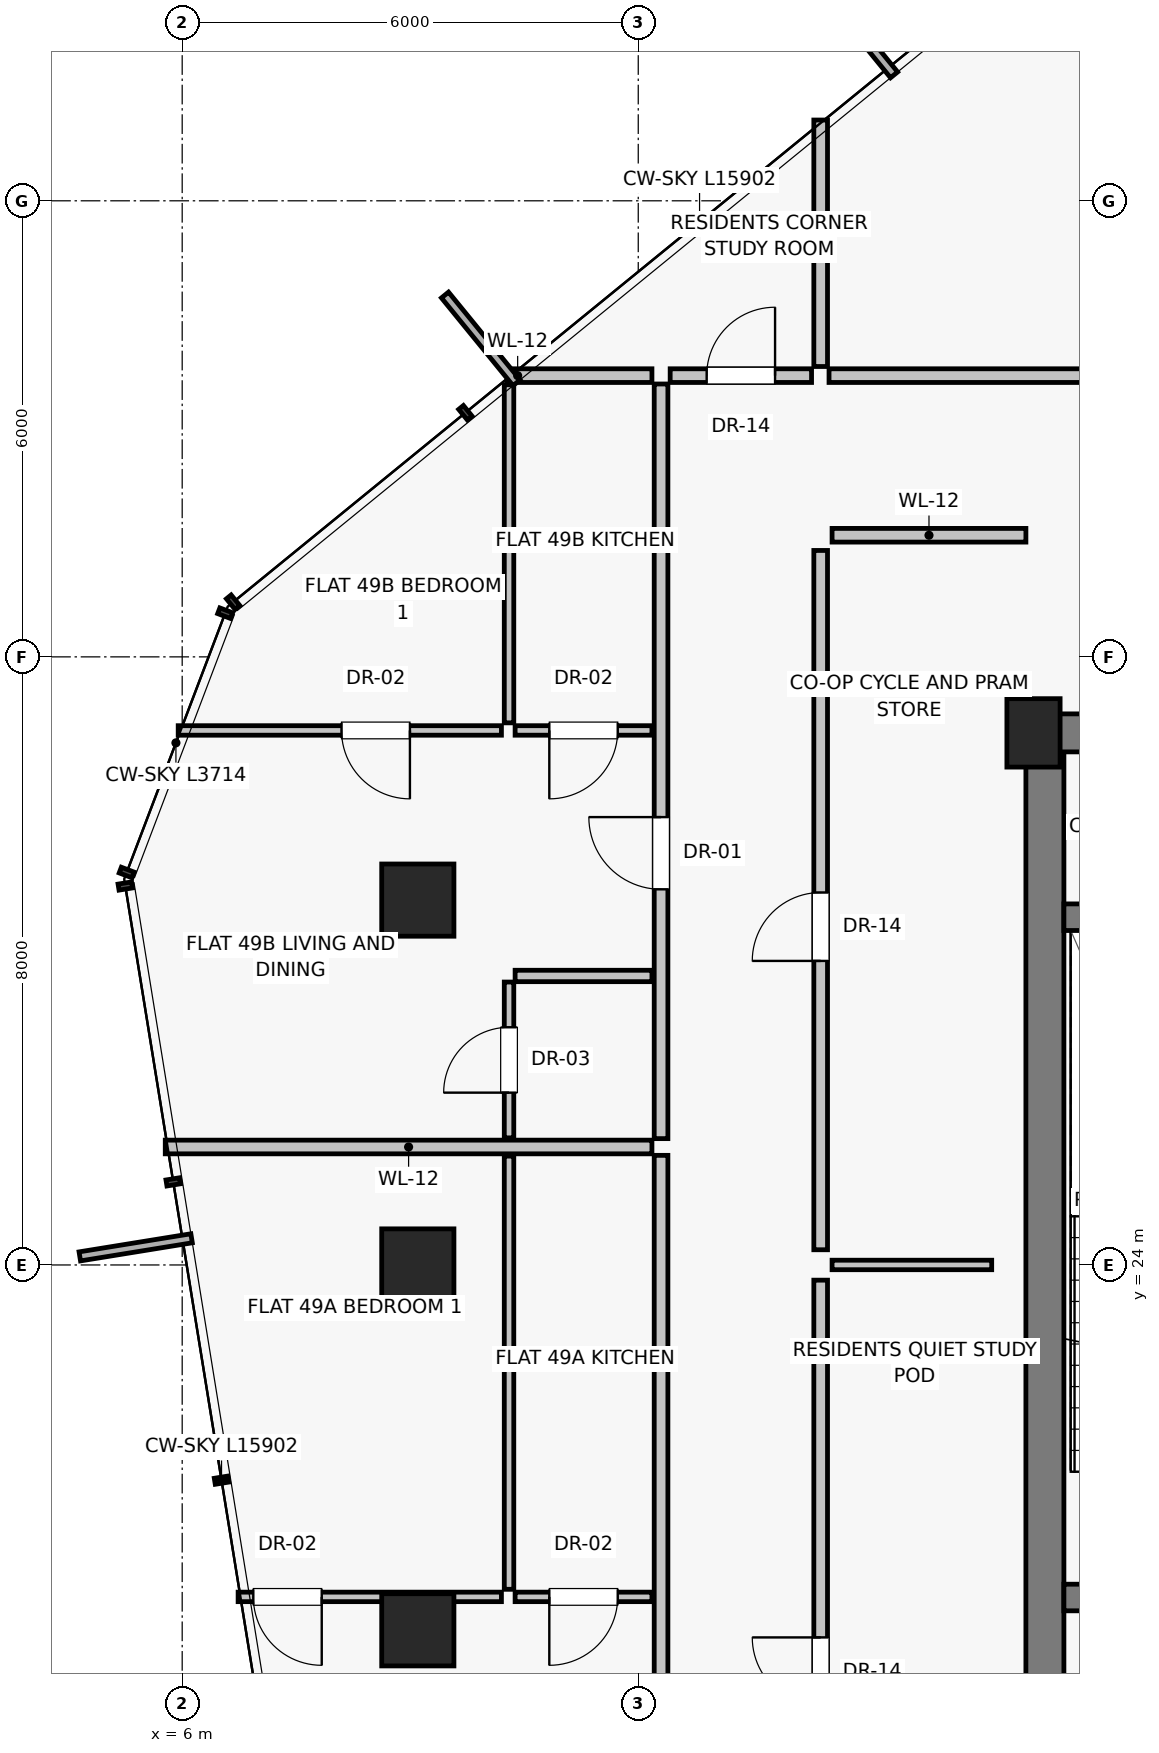
"""IFC4 building model, lengths in metres.
Left out: names, types, materials, properties, quantities, classifications, styles, units other than length and angle.
Written with IfcOpenShell. Run it as: python <this file> out.ifc"""

import sys

from ifc_helpers import new_model, si_unit, direction, frame, frame_2d, origin, origin_2d, place, context, subcontext, project, spatial, rectangle, extrude, source, transform, mapped, element, fill, save


model = new_model("IFC4")
c1 = context("Model", 3, precision=1e-05, world=origin(), true_north=direction((0.0, 1.0)))
c2 = subcontext(c1, "Body", "Model", "MODEL_VIEW")
j1 = project(units=[si_unit("LENGTHUNIT", "METRE"), si_unit("PLANEANGLEUNIT", "RADIAN")], contexts=[c1])
p1 = place(None, origin())
s1 = spatial("IfcSite", under=j1, at=p1, CompositionType="ELEMENT")
p2 = place(p1, origin())
s2 = spatial("IfcBuilding", under=s1, at=p2, CompositionType="ELEMENT")
p3 = place(p2, frame((0.0, 0.0, 174.35)))
s3 = spatial("IfcBuildingStorey", under=s2, at=p3, CompositionType="ELEMENT", Elevation=174.35)
p4 = place(p3, frame((17.2, 31.0, 0.0), z_axis=(0.0, 0.0, 1.0), x_axis=(1.0, 0.0, 0.0)))
e1 = element("IfcColumn", 1, at=p4, inside=s3, PredefinedType="PILASTER", context=c2, shape_type="SweptSolid", body=[
    extrude(rectangle(XDim=0.7, YDim=0.9, at=origin_2d()), origin(), (0.0, 0.0, 1.0), 4.5),
])
for number, where, z_axis, x_axis in (
    (2, (9.1, 28.8, -0.32), (0.0, 0.0, 1.0), (1.0, 0.0, 0.0)),
    (3, (9.1, 24.0, -0.32), (0.0, 0.0, 1.0), (1.0, 0.0, 0.0)),
    (4, (9.1, 19.2, -0.32), (0.0, 0.0, 1.0), (1.0, 0.0, 0.0)),
):
    element("IfcColumn", number, at=place(p3, frame(where, z_axis=z_axis, x_axis=x_axis)), inside=s3, PredefinedType="COLUMN", context=c2, shape_type="SweptSolid", body=[
        extrude(rectangle(XDim=0.95, YDim=0.95, at=origin_2d()), origin(), (0.0, 0.0, 1.0), 4.82),
    ])
p5 = place(p3, frame((17.35, 16.8, 0.0), z_axis=(0.0, 0.0, 1.0), x_axis=(0.0, 1.0, 0.0)))
e5 = element("IfcWall", 5, at=p5, inside=s3, PredefinedType="SHEAR", context=c2, shape_type="SweptSolid", body=[
    extrude(rectangle(XDim=14.2, YDim=0.5, at=frame_2d((7.1, 0.0))), origin(), (0.0, 0.0, 1.0), 4.265),
])
p6 = place(p3, frame((17.2, 31.0, 0.0), z_axis=(0.0, 0.0, 1.0), x_axis=(1.0, 0.0, 0.0)))
e6 = element("IfcWall", 6, at=p6, inside=s3, PredefinedType="SHEAR", context=c2, shape_type="SweptSolid", body=[
    extrude(rectangle(XDim=3.8, YDim=0.5, at=frame_2d((1.9, 0.0))), origin(), (0.0, 0.0, 1.0), 4.265),
])
p7 = place(p6, frame((1.25, 0.0, 0.0)))
e7 = element("IfcOpeningElement", 7, at=p7, cuts=e6, PredefinedType="OPENING", context=c2, shape_type="SweptSolid", body=[
    extrude(rectangle(XDim=0.86, YDim=2.01, at=frame_2d((0.43, 1.005))), frame((0.0, 0.26, 0.0), z_axis=(0.0, -1.0, 0.0), x_axis=(1.0, 0.0, 0.0)), (0.0, 0.0, 1.0), 0.52),
])
p8 = place(p3, frame((17.6, 19.625, 0.0), z_axis=(0.0, 0.0, 1.0), x_axis=(1.0, 0.0, 0.0)))
e8 = element("IfcWall", 8, at=p8, inside=s3, PredefinedType="SHEAR", context=c2, shape_type="SweptSolid", body=[
    extrude(rectangle(XDim=3.375, YDim=0.35, at=frame_2d((1.688, 0.0))), origin(), (0.0, 0.0, 1.0), 4.265),
])
p9 = place(p8, frame((1.05, 0.0, 0.0)))
e9 = element("IfcOpeningElement", 9, at=p9, cuts=e8, PredefinedType="OPENING", context=c2, shape_type="SweptSolid", body=[
    extrude(rectangle(XDim=1.1, YDim=2.03, at=frame_2d((0.55, 1.015))), frame((0.0, 0.185, 0.0), z_axis=(0.0, -1.0, 0.0), x_axis=(1.0, 0.0, 0.0)), (0.0, 0.0, 1.0), 0.37),
])
p10 = place(p3, frame((17.6, 28.575, 0.0), z_axis=(0.0, 0.0, 1.0), x_axis=(1.0, 0.0, 0.0)))
e10 = element("IfcWall", 10, at=p10, inside=s3, PredefinedType="SHEAR", context=c2, shape_type="SweptSolid", body=[
    extrude(rectangle(XDim=3.375, YDim=0.35, at=frame_2d((1.688, 0.0))), origin(), (0.0, 0.0, 1.0), 4.265),
])
p11 = place(p3, frame((14.4, 14.4, 0.0), z_axis=(0.0, 0.0, 1.0), x_axis=(0.0, 1.0, 0.0)))
e11 = element("IfcWall", 11, at=p11, inside=s3, PredefinedType="PARTITIONING", context=c2, shape_type="SweptSolid", body=[
    extrude(rectangle(XDim=9.4, YDim=0.18, at=frame_2d((4.7, 0.0))), origin(), (0.0, 0.0, 1.0), 4.265),
])
p12 = place(p11, frame((3.8, 0.0, 0.0)))
e12 = element("IfcOpeningElement", 12, at=p12, cuts=e11, PredefinedType="OPENING", context=c2, shape_type="SweptSolid", body=[
    extrude(rectangle(XDim=0.9, YDim=2.01, at=frame_2d((0.45, 1.005))), frame((0.0, 0.1, 0.0), z_axis=(0.0, -1.0, 0.0), x_axis=(1.0, 0.0, 0.0)), (0.0, 0.0, 1.0), 0.2),
])
p13 = place(p3, frame((14.4, 24.2, 0.0), z_axis=(0.0, 0.0, 1.0), x_axis=(0.0, 1.0, 0.0)))
e13 = element("IfcWall", 13, at=p13, inside=s3, PredefinedType="PARTITIONING", context=c2, shape_type="SweptSolid", body=[
    extrude(rectangle(XDim=9.2, YDim=0.18, at=frame_2d((4.6, 0.0))), origin(), (0.0, 0.0, 1.0), 4.265),
])
p14 = place(p13, frame((3.8, 0.0, 0.0)))
e14 = element("IfcOpeningElement", 14, at=p14, cuts=e13, PredefinedType="OPENING", context=c2, shape_type="SweptSolid", body=[
    extrude(rectangle(XDim=0.9, YDim=2.01, at=frame_2d((0.45, 1.005))), frame((0.0, 0.1, 0.0), z_axis=(0.0, -1.0, 0.0), x_axis=(1.0, 0.0, 0.0)), (0.0, 0.0, 1.0), 0.2),
])
p15 = place(p3, frame((14.55, 24.0, 0.0), z_axis=(0.0, 0.0, 1.0), x_axis=(1.0, 0.0, 0.0)))
e15 = element("IfcWall", 15, at=p15, inside=s3, PredefinedType="PARTITIONING", context=c2, shape_type="SweptSolid", body=[
    extrude(rectangle(XDim=2.1, YDim=0.125, at=frame_2d((1.05, 0.0))), origin(), (0.0, 0.0, 1.0), 4.265),
])
p16 = place(p3, frame((14.55, 33.6, 0.0), z_axis=(0.0, 0.0, 1.0), x_axis=(1.0, 0.0, 0.0)))
e16 = element("IfcWall", 16, at=p16, inside=s3, PredefinedType="PARTITIONING", context=c2, shape_type="SweptSolid", body=[
    extrude(rectangle(XDim=2.55, YDim=0.18, at=frame_2d((1.275, 0.0))), origin(), (0.0, 0.0, 1.0), 4.265),
])
p17 = place(p3, frame((14.4, 35.82, 0.0), z_axis=(0.0, 0.0, 1.0), x_axis=(0.0, 1.0, 0.0)))
e17 = element("IfcWall", 17, at=p17, inside=s3, PredefinedType="PARTITIONING", context=c2, shape_type="SweptSolid", body=[
    extrude(rectangle(XDim=3.243, YDim=0.18, at=frame_2d((1.621, 0.0))), origin(), (0.0, 0.0, 1.0), 4.265),
])
p18 = place(p3, frame((14.51, 35.7, 0.0), z_axis=(0.0, 0.0, 1.0), x_axis=(1.0, 0.0, 0.0)))
e18 = element("IfcWall", 18, at=p18, inside=s3, PredefinedType="PARTITIONING", context=c2, shape_type="SweptSolid", body=[
    extrude(rectangle(XDim=10.724, YDim=0.18, at=frame_2d((5.362, 0.0))), origin(), (0.0, 0.0, 1.0), 4.265),
])
p19 = place(p18, frame((4.462, 0.0, 0.0)))
e19 = element("IfcOpeningElement", 19, at=p19, cuts=e18, PredefinedType="OPENING", context=c2, shape_type="SweptSolid", body=[
    extrude(rectangle(XDim=1.8, YDim=2.25, at=frame_2d((0.9, 1.125))), frame((0.0, 0.1, 0.0), z_axis=(0.0, -1.0, 0.0), x_axis=(1.0, 0.0, 0.0)), (0.0, 0.0, 1.0), 0.2),
])
p20 = place(p3, frame((12.18, 35.7, 0.0), z_axis=(0.0, 0.0, 1.0), x_axis=(-1.0, 0.0, 0.0)))
e20 = element("IfcWall", 20, at=p20, inside=s3, PredefinedType="PARTITIONING", context=c2, shape_type="SweptSolid", body=[
    extrude(rectangle(XDim=1.903, YDim=0.18, at=frame_2d((0.951, 0.0))), origin(), (0.0, 0.0, 1.0), 4.265),
])
p21 = place(p3, frame((12.3, 12.21, 0.0), z_axis=(0.0, 0.0, 1.0), x_axis=(0.0, 1.0, 0.0)))
e21 = element("IfcWall", 21, at=p21, inside=s3, PredefinedType="PARTITIONING", context=c2, shape_type="SweptSolid", body=[
    extrude(rectangle(XDim=13.232, YDim=0.18, at=frame_2d((6.616, 0.0))), origin(), (0.0, 0.0, 1.0), 4.265),
])
p22 = place(p21, frame((4.306, 0.0, 0.0)))
e22 = element("IfcOpeningElement", 22, at=p22, cuts=e21, PredefinedType="OPENING", context=c2, shape_type="SweptSolid", body=[
    extrude(rectangle(XDim=0.95, YDim=2.02, at=frame_2d((0.475, 1.01))), frame((0.0, 0.1, 0.0), z_axis=(0.0, -1.0, 0.0), x_axis=(1.0, 0.0, 0.0)), (0.0, 0.0, 1.0), 0.2),
])
p23 = place(p3, frame((12.18, 19.633, 0.0), z_axis=(0.0, 0.0, 1.0), x_axis=(-1.0, 0.0, 0.0)))
e23 = element("IfcWall", 23, at=p23, inside=s3, PredefinedType="PARTITIONING", context=c2, shape_type="SweptSolid", body=[
    extrude(rectangle(XDim=1.8, YDim=0.125, at=frame_2d((0.9, 0.0))), origin(), (0.0, 0.0, 1.0), 4.265),
])
p24 = place(p23, frame((0.45, 0.0, 0.0)))
e24 = element("IfcOpeningElement", 24, at=p24, cuts=e23, PredefinedType="OPENING", context=c2, shape_type="SweptSolid", body=[
    extrude(rectangle(XDim=0.9, YDim=2.01, at=frame_2d((0.45, 1.005))), frame((0.0, 0.073, 0.0), z_axis=(0.0, -1.0, 0.0), x_axis=(1.0, 0.0, 0.0)), (0.0, 0.0, 1.0), 0.145),
])
p25 = place(p3, frame((10.3, 19.733, 0.0), z_axis=(0.0, 0.0, 1.0), x_axis=(0.0, 1.0, 0.0)))
e25 = element("IfcWall", 25, at=p25, inside=s3, PredefinedType="PARTITIONING", context=c2, shape_type="SweptSolid", body=[
    extrude(rectangle(XDim=5.699, YDim=0.125, at=frame_2d((2.85, 0.0))), origin(), (0.0, 0.0, 1.0), 4.265),
])
p26 = place(p3, frame((10.2, 19.633, 0.0), z_axis=(0.0, 0.0, 1.0), x_axis=(-1.0, 0.0, 0.0)))
e26 = element("IfcWall", 26, at=p26, inside=s3, PredefinedType="PARTITIONING", context=c2, shape_type="SweptSolid", body=[
    extrude(rectangle(XDim=3.464, YDim=0.125, at=frame_2d((1.732, 0.0))), origin(), (0.0, 0.0, 1.0), 3.719),
])
p27 = place(p26, frame((2.364, 0.0, 0.0)))
e27 = element("IfcOpeningElement", 27, at=p27, cuts=e26, PredefinedType="OPENING", context=c2, shape_type="SweptSolid", body=[
    extrude(rectangle(XDim=0.9, YDim=2.01, at=frame_2d((0.45, 1.005))), frame((0.0, 0.073, 0.0), z_axis=(0.0, -1.0, 0.0), x_axis=(1.0, 0.0, 0.0)), (0.0, 0.0, 1.0), 0.145),
])
p28 = place(p3, frame((12.18, 25.552, 0.0), z_axis=(0.0, 0.0, 1.0), x_axis=(-1.0, 0.0, 0.0)))
e28 = element("IfcWall", 28, at=p28, inside=s3, PredefinedType="PARTITIONING", context=c2, shape_type="SweptSolid", body=[
    extrude(rectangle(XDim=6.403, YDim=0.18, at=frame_2d((3.201, 0.0))), origin(), (0.0, 0.0, 1.0), 4.265),
])
p29 = place(p3, frame((12.3, 25.662, 0.0), z_axis=(0.0, 0.0, 1.0), x_axis=(0.0, 1.0, 0.0)))
e29 = element("IfcWall", 29, at=p29, inside=s3, PredefinedType="PARTITIONING", context=c2, shape_type="SweptSolid", body=[
    extrude(rectangle(XDim=9.928, YDim=0.18, at=frame_2d((4.964, 0.0))), origin(), (0.0, 0.0, 1.0), 4.265),
])
p30 = place(p29, frame((3.28, 0.0, 0.0)))
e30 = element("IfcOpeningElement", 30, at=p30, cuts=e29, PredefinedType="OPENING", context=c2, shape_type="SweptSolid", body=[
    extrude(rectangle(XDim=0.95, YDim=2.02, at=frame_2d((0.475, 1.01))), frame((0.0, 0.1, 0.0), z_axis=(0.0, -1.0, 0.0), x_axis=(1.0, 0.0, 0.0)), (0.0, 0.0, 1.0), 0.2),
])
p31 = place(p3, frame((12.18, 27.802, 0.0), z_axis=(0.0, 0.0, 1.0), x_axis=(-1.0, 0.0, 0.0)))
e31 = element("IfcWall", 31, at=p31, inside=s3, PredefinedType="PARTITIONING", context=c2, shape_type="SweptSolid", body=[
    extrude(rectangle(XDim=1.8, YDim=0.15, at=frame_2d((0.9, 0.0))), origin(), (0.0, 0.0, 1.0), 4.265),
])
p32 = place(p3, frame((10.3, 25.672, 0.0), z_axis=(0.0, 0.0, 1.0), x_axis=(0.0, 1.0, 0.0)))
e32 = element("IfcWall", 32, at=p32, inside=s3, PredefinedType="PARTITIONING", context=c2, shape_type="SweptSolid", body=[
    extrude(rectangle(XDim=2.05, YDim=0.125, at=frame_2d((1.025, 0.0))), origin(), (0.0, 0.0, 1.0), 4.265),
])
p33 = place(p32, frame((0.595, 0.0, 0.0)))
e33 = element("IfcOpeningElement", 33, at=p33, cuts=e32, PredefinedType="OPENING", context=c2, shape_type="SweptSolid", body=[
    extrude(rectangle(XDim=0.86, YDim=2.01, at=frame_2d((0.43, 1.005))), frame((0.0, 0.073, 0.0), z_axis=(0.0, -1.0, 0.0), x_axis=(1.0, 0.0, 0.0)), (0.0, 0.0, 1.0), 0.145),
])
p34 = place(p3, frame((12.18, 31.032, 0.0), z_axis=(0.0, 0.0, 1.0), x_axis=(-1.0, 0.0, 0.0)))
e34 = element("IfcWall", 34, at=p34, inside=s3, PredefinedType="PARTITIONING", context=c2, shape_type="SweptSolid", body=[
    extrude(rectangle(XDim=1.8, YDim=0.125, at=frame_2d((0.9, 0.0))), origin(), (0.0, 0.0, 1.0), 4.265),
])
p35 = place(p34, frame((0.45, 0.0, 0.0)))
e35 = element("IfcOpeningElement", 35, at=p35, cuts=e34, PredefinedType="OPENING", context=c2, shape_type="SweptSolid", body=[
    extrude(rectangle(XDim=0.9, YDim=2.01, at=frame_2d((0.45, 1.005))), frame((0.0, 0.073, 0.0), z_axis=(0.0, -1.0, 0.0), x_axis=(1.0, 0.0, 0.0)), (0.0, 0.0, 1.0), 0.145),
])
p36 = place(p3, frame((10.3, 31.132, 0.0), z_axis=(0.0, 0.0, 1.0), x_axis=(0.0, 1.0, 0.0)))
e36 = element("IfcWall", 36, at=p36, inside=s3, PredefinedType="PARTITIONING", context=c2, shape_type="SweptSolid", body=[
    extrude(rectangle(XDim=4.448, YDim=0.125, at=frame_2d((2.224, 0.0))), origin(), (0.0, 0.0, 1.0), 4.265),
])
p37 = place(p3, frame((10.2, 31.032, 0.0), z_axis=(0.0, 0.0, 1.0), x_axis=(-1.0, 0.0, 0.0)))
e37 = element("IfcWall", 37, at=p37, inside=s3, PredefinedType="PARTITIONING", context=c2, shape_type="SweptSolid", body=[
    extrude(rectangle(XDim=4.252, YDim=0.125, at=frame_2d((2.126, 0.0))), origin(), (0.0, 0.0, 1.0), 4.265),
])
p38 = place(p37, frame((1.204, 0.0, 0.0)))
e38 = element("IfcOpeningElement", 38, at=p38, cuts=e37, PredefinedType="OPENING", context=c2, shape_type="SweptSolid", body=[
    extrude(rectangle(XDim=0.9, YDim=2.01, at=frame_2d((0.45, 1.005))), frame((0.0, 0.073, 0.0), z_axis=(0.0, -1.0, 0.0), x_axis=(1.0, 0.0, 0.0)), (0.0, 0.0, 1.0), 0.145),
])
p39 = place(p3, frame((12.42, 35.7, 0.0), z_axis=(0.0, 0.0, 1.0), x_axis=(1.0, 0.0, 0.0)))
e39 = element("IfcWall", 39, at=p39, inside=s3, PredefinedType="PARTITIONING", context=c2, shape_type="SweptSolid", body=[
    extrude(rectangle(XDim=1.86, YDim=0.18, at=frame_2d((0.93, 0.0))), origin(), (0.0, 0.0, 1.0), 4.265),
])
p40 = place(p39, frame((0.48, 0.0, 0.0)))
e40 = element("IfcOpeningElement", 40, at=p40, cuts=e39, PredefinedType="OPENING", context=c2, shape_type="SweptSolid", body=[
    extrude(rectangle(XDim=0.9, YDim=2.01, at=frame_2d((0.45, 1.005))), frame((0.0, 0.1, 0.0), z_axis=(0.0, -1.0, 0.0), x_axis=(1.0, 0.0, 0.0)), (0.0, 0.0, 1.0), 0.2),
])
m1 = source(origin(), c2, "Body", "SweptSolid", [
    extrude(rectangle(XDim=0.9, YDim=2.01, at=frame_2d((0.45, 1.005))), frame((0.0, 0.025, 0.0), z_axis=(0.0, -1.0, 0.0), x_axis=(1.0, 0.0, 0.0)), (0.0, 0.0, 1.0), 0.05),
])
p41 = place(p12, origin())
e41 = element("IfcDoor", 41, at=p41, inside=s3, OperationType="SINGLE_SWING_RIGHT", PredefinedType="DOOR", context=c2, shape_type="MappedRepresentation", body=[
    mapped(m1, transform((0.0, 0.0, 0.0), scale=1.0)),
])
fill(e12, e41)
p42 = place(p14, origin())
e42 = element("IfcDoor", 42, at=p42, inside=s3, OperationType="SINGLE_SWING_LEFT", PredefinedType="DOOR", context=c2, shape_type="MappedRepresentation", body=[
    mapped(m1, transform((0.0, 0.0, 0.0), scale=1.0)),
])
fill(e14, e42)
p43 = place(p24, origin())
e43 = element("IfcDoor", 43, at=p43, inside=s3, OperationType="SINGLE_SWING_RIGHT", PredefinedType="DOOR", context=c2, shape_type="MappedRepresentation", body=[
    mapped(m1, transform((0.0, 0.0, 0.0), scale=1.0)),
])
fill(e24, e43)
p44 = place(p27, origin())
e44 = element("IfcDoor", 44, at=p44, inside=s3, OperationType="SINGLE_SWING_LEFT", PredefinedType="DOOR", context=c2, shape_type="MappedRepresentation", body=[
    mapped(m1, transform((0.0, 0.0, 0.0), scale=1.0)),
])
fill(e27, e44)
m2 = source(origin(), c2, "Body", "SweptSolid", [
    extrude(rectangle(XDim=0.95, YDim=2.02, at=frame_2d((0.475, 1.01))), frame((0.0, 0.025, 0.0), z_axis=(0.0, -1.0, 0.0), x_axis=(1.0, 0.0, 0.0)), (0.0, 0.0, 1.0), 0.05),
])
p45 = place(p30, origin())
e45 = element("IfcDoor", 45, at=p45, inside=s3, OperationType="SINGLE_SWING_RIGHT", PredefinedType="DOOR", context=c2, shape_type="MappedRepresentation", body=[
    mapped(m2, transform((0.0, 0.0, 0.0), scale=1.0)),
])
fill(e30, e45)
m3 = source(origin(), c2, "Body", "SweptSolid", [
    extrude(rectangle(XDim=0.86, YDim=2.01, at=frame_2d((0.43, 1.005))), frame((0.0, 0.025, 0.0), z_axis=(0.0, -1.0, 0.0), x_axis=(1.0, 0.0, 0.0)), (0.0, 0.0, 1.0), 0.05),
])
p46 = place(p33, origin())
e46 = element("IfcDoor", 46, at=p46, inside=s3, OperationType="SINGLE_SWING_LEFT", PredefinedType="DOOR", context=c2, shape_type="MappedRepresentation", body=[
    mapped(m3, transform((0.0, 0.0, 0.0), scale=1.0)),
])
fill(e33, e46)
p47 = place(p35, origin())
e47 = element("IfcDoor", 47, at=p47, inside=s3, OperationType="SINGLE_SWING_RIGHT", PredefinedType="DOOR", context=c2, shape_type="MappedRepresentation", body=[
    mapped(m1, transform((0.0, 0.0, 0.0), scale=1.0)),
])
fill(e35, e47)
p48 = place(p38, origin())
e48 = element("IfcDoor", 48, at=p48, inside=s3, OperationType="SINGLE_SWING_LEFT", PredefinedType="DOOR", context=c2, shape_type="MappedRepresentation", body=[
    mapped(m1, transform((0.0, 0.0, 0.0), scale=1.0)),
])
fill(e38, e48)
p49 = place(p40, origin())
e49 = element("IfcDoor", 49, at=p49, inside=s3, OperationType="SINGLE_SWING_RIGHT", PredefinedType="DOOR", context=c2, shape_type="MappedRepresentation", body=[
    mapped(m1, transform((0.0, 0.0, 0.0), scale=1.0)),
])
fill(e40, e49)
save(model, sys.argv[1])
